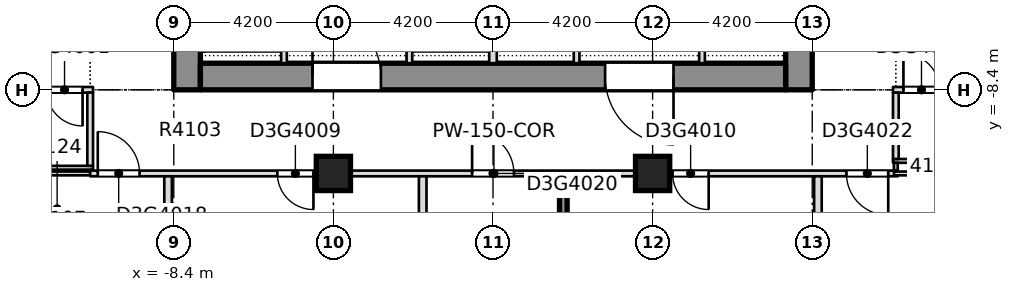
"""IFC4 building model, lengths in metres.
Left out: names, types, materials, properties, quantities, classifications, styles, units other than length and angle.
Written with IfcOpenShell. Run it as: python <this file> out.ifc"""

import sys

from ifc_helpers import new_model, si_unit, direction, frame, frame_2d, origin, origin_2d, place, context, subcontext, project, spatial, rectangle, extrude, element, fill, save


model = new_model("IFC4")
c1 = context("Model", 3, precision=1e-05, world=origin(), true_north=direction((0.0, 1.0)))
c2 = subcontext(c1, "Body", "Model", "MODEL_VIEW")
j1 = project(units=[si_unit("LENGTHUNIT", "METRE"), si_unit("PLANEANGLEUNIT", "RADIAN")], contexts=[c1])
p1 = place(None, origin())
s1 = spatial("IfcSite", under=j1, at=p1, CompositionType="ELEMENT")
p2 = place(p1, origin())
s2 = spatial("IfcBuilding", under=s1, at=p2, CompositionType="ELEMENT")
p3 = place(p2, frame((0.0, 0.0, 160.7)))
s3 = spatial("IfcBuildingStorey", under=s2, at=p3, CompositionType="ELEMENT", Elevation=160.7)
p4 = place(p3, frame((8.05, -8.4, -0.4), z_axis=(0.0, 0.0, 1.0), x_axis=(0.0, 1.0, 0.0)))
e1 = element("IfcWall", 1, at=p4, inside=s3, PredefinedType="SOLIDWALL", context=c2, shape_type="SweptSolid", body=[
    extrude(rectangle(XDim=30.15, YDim=0.7, at=frame_2d((15.075, 0.0))), origin(), (0.0, 0.0, 1.0), 3.45),
])
p5 = place(p4, frame((19.3, 0.0, 0.4)))
e2 = element("IfcOpeningElement", 2, at=p5, cuts=e1, PredefinedType="OPENING", context=c2, shape_type="SweptSolid", body=[
    extrude(rectangle(XDim=1.2, YDim=2.1, at=frame_2d((0.6, 1.05))), frame((0.0, 0.36, 0.0), z_axis=(0.0, -1.0, 0.0), x_axis=(1.0, 0.0, 0.0)), (0.0, 0.0, 1.0), 0.72),
])
p6 = place(p3, frame((-8.05, -8.4, -0.4), z_axis=(0.0, 0.0, 1.0), x_axis=(0.0, 1.0, 0.0)))
e3 = element("IfcWall", 3, at=p6, inside=s3, PredefinedType="SOLIDWALL", context=c2, shape_type="SweptSolid", body=[
    extrude(rectangle(XDim=30.15, YDim=0.7, at=frame_2d((15.075, 0.0))), origin(), (0.0, 0.0, 1.0), 3.45),
])
p7 = place(p6, frame((19.3, 0.0, 0.4)))
e4 = element("IfcOpeningElement", 4, at=p7, cuts=e3, PredefinedType="OPENING", context=c2, shape_type="SweptSolid", body=[
    extrude(rectangle(XDim=1.2, YDim=2.1, at=frame_2d((0.6, 1.05))), frame((0.0, 0.36, 0.0), z_axis=(0.0, -1.0, 0.0), x_axis=(1.0, 0.0, 0.0)), (0.0, 0.0, 1.0), 0.72),
])
p8 = place(p3, frame((-7.7, -8.05, -0.4), z_axis=(0.0, 0.0, 1.0), x_axis=(1.0, 0.0, 0.0)))
e5 = element("IfcWall", 5, at=p8, inside=s3, PredefinedType="SHEAR", context=c2, shape_type="SweptSolid", body=[
    extrude(rectangle(XDim=15.4, YDim=0.7, at=frame_2d((7.7, 0.0))), origin(), (0.0, 0.0, 1.0), 3.45),
])
p9 = place(p8, frame((2.95, 0.0, 0.4)))
e6 = element("IfcOpeningElement", 6, at=p9, cuts=e5, PredefinedType="OPENING", context=c2, shape_type="SweptSolid", body=[
    extrude(rectangle(XDim=1.8, YDim=2.1, at=frame_2d((0.9, 1.05))), frame((0.0, 0.36, 0.0), z_axis=(0.0, -1.0, 0.0), x_axis=(1.0, 0.0, 0.0)), (0.0, 0.0, 1.0), 0.72),
])
p10 = place(p8, frame((10.65, 0.0, 0.4)))
e7 = element("IfcOpeningElement", 7, at=p10, cuts=e5, PredefinedType="OPENING", context=c2, shape_type="SweptSolid", body=[
    extrude(rectangle(XDim=1.8, YDim=2.1, at=frame_2d((0.9, 1.05))), frame((0.0, 0.36, 0.0), z_axis=(0.0, -1.0, 0.0), x_axis=(1.0, 0.0, 0.0)), (0.0, 0.0, 1.0), 0.72),
])
for number, where, z_axis, x_axis in (
    (8, (-4.2, -10.6, -0.4), (0.0, 0.0, 1.0), (1.0, 0.0, 0.0)),
    (9, (4.2, -10.6, -0.4), (0.0, 0.0, 1.0), (1.0, 0.0, 0.0)),
):
    element("IfcColumn", number, at=place(p3, frame(where, z_axis=z_axis, x_axis=x_axis)), inside=s3, PredefinedType="COLUMN", context=c2, shape_type="SweptSolid", body=[
        extrude(rectangle(XDim=0.9, YDim=0.9, at=origin_2d()), origin(), (0.0, 0.0, 1.0), 3.45),
    ])
p11 = place(p3, frame((-12.3, -10.6, 0.0), z_axis=(0.0, 0.0, 1.0), x_axis=(1.0, 0.0, 0.0)))
e10 = element("IfcWall", 10, at=p11, inside=s3, PredefinedType="PARTITIONING", context=c2, shape_type="SweptSolid", body=[
    extrude(rectangle(XDim=1.7, YDim=0.1, at=frame_2d((0.85, 0.0))), origin(), (0.0, 0.0, 1.0), 3.05),
])
p12 = place(p3, frame((-10.6, -10.6, 0.0), z_axis=(0.0, 0.0, 1.0), x_axis=(1.0, 0.0, 0.0)))
e11 = element("IfcWall", 11, at=p12, inside=s3, PredefinedType="PARTITIONING", context=c2, shape_type="SweptSolid", body=[
    extrude(rectangle(XDim=21.25, YDim=0.15, at=frame_2d((10.625, 0.0))), origin(), (0.0, 0.0, 1.0), 3.05),
])
p13 = place(p12, frame((4.925, 0.0, 0.0)))
e12 = element("IfcOpeningElement", 12, at=p13, cuts=e11, PredefinedType="OPENING", context=c2, shape_type="SweptSolid", body=[
    extrude(rectangle(XDim=0.95, YDim=2.1, at=frame_2d((0.475, 1.05))), frame((0.0, 0.085, 0.0), z_axis=(0.0, -1.0, 0.0), x_axis=(1.0, 0.0, 0.0)), (0.0, 0.0, 1.0), 0.17),
])
p14 = place(p12, frame((15.325, 0.0, 0.0)))
e13 = element("IfcOpeningElement", 13, at=p14, cuts=e11, PredefinedType="OPENING", context=c2, shape_type="SweptSolid", body=[
    extrude(rectangle(XDim=0.95, YDim=2.1, at=frame_2d((0.475, 1.05))), frame((0.0, 0.085, 0.0), z_axis=(0.0, -1.0, 0.0), x_axis=(1.0, 0.0, 0.0)), (0.0, 0.0, 1.0), 0.17),
])
p15 = place(p12, frame((0.2, 0.0, 0.0)))
e14 = element("IfcOpeningElement", 14, at=p15, cuts=e11, PredefinedType="OPENING", context=c2, shape_type="SweptSolid", body=[
    extrude(rectangle(XDim=1.1, YDim=2.1, at=frame_2d((0.55, 1.05))), frame((0.0, 0.085, 0.0), z_axis=(0.0, -1.0, 0.0), x_axis=(1.0, 0.0, 0.0)), (0.0, 0.0, 1.0), 0.17),
])
p16 = place(p12, frame((10.05, 0.0, 0.0)))
e15 = element("IfcOpeningElement", 15, at=p16, cuts=e11, PredefinedType="OPENING", context=c2, shape_type="SweptSolid", body=[
    extrude(rectangle(XDim=1.1, YDim=2.1, at=frame_2d((0.55, 1.05))), frame((0.0, 0.085, 0.0), z_axis=(0.0, -1.0, 0.0), x_axis=(1.0, 0.0, 0.0)), (0.0, 0.0, 1.0), 0.17),
])
p17 = place(p12, frame((19.9, 0.0, 0.0)))
e16 = element("IfcOpeningElement", 16, at=p17, cuts=e11, PredefinedType="OPENING", context=c2, shape_type="SweptSolid", body=[
    extrude(rectangle(XDim=1.1, YDim=2.1, at=frame_2d((0.55, 1.05))), frame((0.0, 0.085, 0.0), z_axis=(0.0, -1.0, 0.0), x_axis=(1.0, 0.0, 0.0)), (0.0, 0.0, 1.0), 0.17),
])
p18 = place(p3, frame((10.55, -10.6, 0.0), z_axis=(0.0, 0.0, 1.0), x_axis=(1.0, 0.0, 0.0)))
e17 = element("IfcWall", 17, at=p18, inside=s3, PredefinedType="PARTITIONING", context=c2, shape_type="SweptSolid", body=[
    extrude(rectangle(XDim=1.75, YDim=0.1, at=frame_2d((0.875, 0.0))), origin(), (0.0, 0.0, 1.0), 3.05),
])
p19 = place(p3, frame((-13.55, -10.45, 0.0), z_axis=(0.0, 0.0, 1.0), x_axis=(1.0, 0.0, 0.0)))
e18 = element("IfcWall", 18, at=p19, inside=s3, PredefinedType="PARTITIONING", context=c2, shape_type="SweptSolid", body=[
    extrude(rectangle(XDim=3.025, YDim=0.1, at=frame_2d((1.513, 0.0))), origin(), (0.0, 0.0, 1.0), 3.05),
])
p20 = place(p3, frame((10.525, -10.27, 0.0), z_axis=(0.0, 0.0, 1.0), x_axis=(1.0, 0.0, 0.0)))
e19 = element("IfcWall", 19, at=p20, inside=s3, PredefinedType="PARTITIONING", context=c2, shape_type="SweptSolid", body=[
    extrude(rectangle(XDim=2.725, YDim=0.1, at=frame_2d((1.363, 0.0))), origin(), (0.0, 0.0, 1.0), 3.05),
])
p21 = place(p3, frame((-21.55, -8.4, 0.0), z_axis=(0.0, 0.0, 1.0), x_axis=(1.0, 0.0, 0.0)))
e20 = element("IfcWall", 20, at=p21, inside=s3, PredefinedType="PARTITIONING", context=c2, shape_type="SweptSolid", body=[
    extrude(rectangle(XDim=11.025, YDim=0.15, at=frame_2d((5.513, 0.0))), origin(), (0.0, 0.0, 1.0), 3.05),
])
p22 = place(p21, frame((9.8, 0.0, 0.0)))
e21 = element("IfcOpeningElement", 21, at=p22, cuts=e20, PredefinedType="OPENING", context=c2, shape_type="SweptSolid", body=[
    extrude(rectangle(XDim=0.95, YDim=2.1, at=frame_2d((0.475, 1.05))), frame((0.0, 0.085, 0.0), z_axis=(0.0, -1.0, 0.0), x_axis=(1.0, 0.0, 0.0)), (0.0, 0.0, 1.0), 0.17),
])
p23 = place(p3, frame((10.525, -8.4, 0.0), z_axis=(0.0, 0.0, 1.0), x_axis=(1.0, 0.0, 0.0)))
e22 = element("IfcWall", 22, at=p23, inside=s3, PredefinedType="PARTITIONING", context=c2, shape_type="SweptSolid", body=[
    extrude(rectangle(XDim=11.025, YDim=0.15, at=frame_2d((5.513, 0.0))), origin(), (0.0, 0.0, 1.0), 3.05),
])
p24 = place(p23, frame((0.275, 0.0, 0.0)))
e23 = element("IfcOpeningElement", 23, at=p24, cuts=e22, PredefinedType="OPENING", context=c2, shape_type="SweptSolid", body=[
    extrude(rectangle(XDim=0.95, YDim=2.1, at=frame_2d((0.475, 1.05))), frame((0.0, 0.085, 0.0), z_axis=(0.0, -1.0, 0.0), x_axis=(1.0, 0.0, 0.0)), (0.0, 0.0, 1.0), 0.17),
])
p25 = place(p3, frame((-10.6, -10.4, 0.0), z_axis=(0.0, 0.0, 1.0), x_axis=(0.0, 1.0, 0.0)))
e24 = element("IfcWall", 24, at=p25, inside=s3, PredefinedType="PARTITIONING", context=c2, shape_type="SweptSolid", body=[
    extrude(rectangle(XDim=1.925, YDim=0.15, at=frame_2d((0.962, 0.0))), origin(), (0.0, 0.0, 1.0), 3.05),
])
for number, where, z_axis, x_axis in (
    (25, (-8.55, -12.998, 0.0), (0.0, 0.0, 1.0), (0.0, 1.0, 0.0)),
    (26, (-1.85, -12.998, 0.0), (0.0, 0.0, 1.0), (0.0, 1.0, 0.0)),
    (27, (8.55, -12.998, 0.0), (0.0, 0.0, 1.0), (0.0, 1.0, 0.0)),
):
    element("IfcWall", number, at=place(p3, frame(where, z_axis=z_axis, x_axis=x_axis)), inside=s3, PredefinedType="PARTITIONING", context=c2, shape_type="SweptSolid", body=[
        extrude(rectangle(XDim=2.323, YDim=0.2, at=frame_2d((1.162, 0.0))), origin(), (0.0, 0.0, 1.0), 3.05),
    ])
p26 = place(p3, frame((10.6, -10.525, 0.0), z_axis=(0.0, 0.0, 1.0), x_axis=(0.0, 1.0, 0.0)))
e28 = element("IfcWall", 28, at=p26, inside=s3, PredefinedType="PARTITIONING", context=c2, shape_type="SweptSolid", body=[
    extrude(rectangle(XDim=0.205, YDim=0.1, at=frame_2d((0.103, 0.0))), origin(), (0.0, 0.0, 1.0), 3.05),
])
p27 = place(p3, frame((10.6, -10.22, 0.0), z_axis=(0.0, 0.0, 1.0), x_axis=(0.0, 1.0, 0.0)))
e29 = element("IfcWall", 29, at=p27, inside=s3, PredefinedType="PARTITIONING", context=c2, shape_type="SweptSolid", body=[
    extrude(rectangle(XDim=1.745, YDim=0.15, at=frame_2d((0.873, 0.0))), origin(), (0.0, 0.0, 1.0), 3.05),
])
p28 = place(p3, frame((-5.5, -7.699, 0.0), z_axis=(0.0, 0.0, 1.0), x_axis=(0.0, 1.0, 0.0)))
e30 = element("IfcWall", 30, at=p28, inside=s3, PredefinedType="PARTITIONING", context=c2, shape_type="SweptSolid", body=[
    extrude(rectangle(XDim=12.124, YDim=0.15, at=frame_2d((6.062, 0.0))), origin(), (0.0, 0.0, 1.0), 3.05),
])
p29 = place(p28, frame((1.149, 0.0, 0.0)))
e31 = element("IfcOpeningElement", 31, at=p29, cuts=e30, PredefinedType="OPENING", context=c2, shape_type="SweptSolid", body=[
    extrude(rectangle(XDim=1.1, YDim=2.1, at=frame_2d((0.55, 1.05))), frame((0.0, 0.085, 0.0), z_axis=(0.0, -1.0, 0.0), x_axis=(1.0, 0.0, 0.0)), (0.0, 0.0, 1.0), 0.17),
])
p30 = place(p28, frame((4.149, 0.0, 0.0)))
e32 = element("IfcOpeningElement", 32, at=p30, cuts=e30, PredefinedType="OPENING", context=c2, shape_type="SweptSolid", body=[
    extrude(rectangle(XDim=1.1, YDim=2.1, at=frame_2d((0.55, 1.05))), frame((0.0, 0.085, 0.0), z_axis=(0.0, -1.0, 0.0), x_axis=(1.0, 0.0, 0.0)), (0.0, 0.0, 1.0), 0.17),
])
p31 = place(p28, frame((7.149, 0.0, 0.0)))
e33 = element("IfcOpeningElement", 33, at=p31, cuts=e30, PredefinedType="OPENING", context=c2, shape_type="SweptSolid", body=[
    extrude(rectangle(XDim=1.1, YDim=2.1, at=frame_2d((0.55, 1.05))), frame((0.0, 0.085, 0.0), z_axis=(0.0, -1.0, 0.0), x_axis=(1.0, 0.0, 0.0)), (0.0, 0.0, 1.0), 0.17),
])
p32 = place(p28, frame((10.149, 0.0, 0.0)))
e34 = element("IfcOpeningElement", 34, at=p32, cuts=e30, PredefinedType="OPENING", context=c2, shape_type="SweptSolid", body=[
    extrude(rectangle(XDim=1.1, YDim=2.1, at=frame_2d((0.55, 1.05))), frame((0.0, 0.085, 0.0), z_axis=(0.0, -1.0, 0.0), x_axis=(1.0, 0.0, 0.0)), (0.0, 0.0, 1.0), 0.17),
])
p33 = place(p3, frame((-2.2, -7.699, 0.0), z_axis=(0.0, 0.0, 1.0), x_axis=(0.0, 1.0, 0.0)))
e35 = element("IfcWall", 35, at=p33, inside=s3, PredefinedType="PARTITIONING", context=c2, shape_type="SweptSolid", body=[
    extrude(rectangle(XDim=12.124, YDim=0.15, at=frame_2d((6.062, 0.0))), origin(), (0.0, 0.0, 1.0), 3.05),
])
p34 = place(p33, frame((1.149, 0.0, 0.0)))
e36 = element("IfcOpeningElement", 36, at=p34, cuts=e35, PredefinedType="OPENING", context=c2, shape_type="SweptSolid", body=[
    extrude(rectangle(XDim=1.1, YDim=2.1, at=frame_2d((0.55, 1.05))), frame((0.0, 0.085, 0.0), z_axis=(0.0, -1.0, 0.0), x_axis=(1.0, 0.0, 0.0)), (0.0, 0.0, 1.0), 0.17),
])
p35 = place(p33, frame((4.224, 0.0, 0.0)))
e37 = element("IfcOpeningElement", 37, at=p35, cuts=e35, PredefinedType="OPENING", context=c2, shape_type="SweptSolid", body=[
    extrude(rectangle(XDim=0.95, YDim=2.1, at=frame_2d((0.475, 1.05))), frame((0.0, 0.085, 0.0), z_axis=(0.0, -1.0, 0.0), x_axis=(1.0, 0.0, 0.0)), (0.0, 0.0, 1.0), 0.17),
])
p36 = place(p33, frame((8.724, 0.0, 0.0)))
e38 = element("IfcOpeningElement", 38, at=p36, cuts=e35, PredefinedType="OPENING", context=c2, shape_type="SweptSolid", body=[
    extrude(rectangle(XDim=0.95, YDim=2.1, at=frame_2d((0.475, 1.05))), frame((0.0, 0.085, 0.0), z_axis=(0.0, -1.0, 0.0), x_axis=(1.0, 0.0, 0.0)), (0.0, 0.0, 1.0), 0.17),
])
p37 = place(p3, frame((0.0, -7.699, 0.0), z_axis=(0.0, 0.0, 1.0), x_axis=(0.0, 1.0, 0.0)))
e39 = element("IfcWall", 39, at=p37, inside=s3, PredefinedType="PARTITIONING", context=c2, shape_type="SweptSolid", body=[
    extrude(rectangle(XDim=12.124, YDim=0.2, at=frame_2d((6.062, 0.0))), origin(), (0.0, 0.0, 1.0), 3.05),
])
p38 = place(p3, frame((2.2, -7.699, 0.0), z_axis=(0.0, 0.0, 1.0), x_axis=(0.0, 1.0, 0.0)))
e40 = element("IfcWall", 40, at=p38, inside=s3, PredefinedType="PARTITIONING", context=c2, shape_type="SweptSolid", body=[
    extrude(rectangle(XDim=12.124, YDim=0.15, at=frame_2d((6.062, 0.0))), origin(), (0.0, 0.0, 1.0), 3.05),
])
p39 = place(p38, frame((1.724, 0.0, 0.0)))
e41 = element("IfcOpeningElement", 41, at=p39, cuts=e40, PredefinedType="OPENING", context=c2, shape_type="SweptSolid", body=[
    extrude(rectangle(XDim=0.95, YDim=2.1, at=frame_2d((0.475, 1.05))), frame((0.0, 0.085, 0.0), z_axis=(0.0, -1.0, 0.0), x_axis=(1.0, 0.0, 0.0)), (0.0, 0.0, 1.0), 0.17),
])
p40 = place(p38, frame((5.724, 0.0, 0.0)))
e42 = element("IfcOpeningElement", 42, at=p40, cuts=e40, PredefinedType="OPENING", context=c2, shape_type="SweptSolid", body=[
    extrude(rectangle(XDim=0.95, YDim=2.1, at=frame_2d((0.475, 1.05))), frame((0.0, 0.085, 0.0), z_axis=(0.0, -1.0, 0.0), x_axis=(1.0, 0.0, 0.0)), (0.0, 0.0, 1.0), 0.17),
])
p41 = place(p38, frame((9.724, 0.0, 0.0)))
e43 = element("IfcOpeningElement", 43, at=p41, cuts=e40, PredefinedType="OPENING", context=c2, shape_type="SweptSolid", body=[
    extrude(rectangle(XDim=0.95, YDim=2.1, at=frame_2d((0.475, 1.05))), frame((0.0, 0.085, 0.0), z_axis=(0.0, -1.0, 0.0), x_axis=(1.0, 0.0, 0.0)), (0.0, 0.0, 1.0), 0.17),
])
p42 = place(p3, frame((5.5, -7.699, 0.0), z_axis=(0.0, 0.0, 1.0), x_axis=(0.0, 1.0, 0.0)))
e44 = element("IfcWall", 44, at=p42, inside=s3, PredefinedType="PARTITIONING", context=c2, shape_type="SweptSolid", body=[
    extrude(rectangle(XDim=12.124, YDim=0.15, at=frame_2d((6.062, 0.0))), origin(), (0.0, 0.0, 1.0), 3.05),
])
p43 = place(p42, frame((5.724, 0.0, 0.0)))
e45 = element("IfcOpeningElement", 45, at=p43, cuts=e44, PredefinedType="OPENING", context=c2, shape_type="SweptSolid", body=[
    extrude(rectangle(XDim=0.95, YDim=2.1, at=frame_2d((0.475, 1.05))), frame((0.0, 0.085, 0.0), z_axis=(0.0, -1.0, 0.0), x_axis=(1.0, 0.0, 0.0)), (0.0, 0.0, 1.0), 0.17),
])
p44 = place(p3, frame((1.85, -21.55, 0.0), z_axis=(0.0, 0.0, 1.0), x_axis=(0.0, 1.0, 0.0)))
e46 = element("IfcWall", 46, at=p44, inside=s3, PredefinedType="SOLIDWALL", context=c2, shape_type="SweptSolid", body=[
    extrude(rectangle(XDim=10.875, YDim=0.2, at=frame_2d((5.438, 0.0))), origin(), (0.0, 0.0, 1.0), 3.05),
])
p45 = place(p22, origin())
e47 = element("IfcDoor", 47, at=p45, inside=s3, OperationType="SINGLE_SWING_RIGHT", PredefinedType="DOOR", context=c2, shape_type="SweptSolid", body=[
    extrude(rectangle(XDim=0.95, YDim=2.1, at=frame_2d((0.475, 1.05))), frame((0.0, 0.025, 0.0), z_axis=(0.0, -1.0, 0.0), x_axis=(1.0, 0.0, 0.0)), (0.0, 0.0, 1.0), 0.05),
])
fill(e21, e47)
p46 = place(p13, origin())
e48 = element("IfcDoor", 48, at=p46, inside=s3, OperationType="SINGLE_SWING_LEFT", PredefinedType="DOOR", context=c2, shape_type="SweptSolid", body=[
    extrude(rectangle(XDim=0.95, YDim=2.1, at=frame_2d((0.475, 1.05))), frame((0.0, 0.025, 0.0), z_axis=(0.0, -1.0, 0.0), x_axis=(1.0, 0.0, 0.0)), (0.0, 0.0, 1.0), 0.05),
])
fill(e12, e48)
p47 = place(p14, origin())
e49 = element("IfcDoor", 49, at=p47, inside=s3, OperationType="SINGLE_SWING_LEFT", PredefinedType="DOOR", context=c2, shape_type="SweptSolid", body=[
    extrude(rectangle(XDim=0.95, YDim=2.1, at=frame_2d((0.475, 1.05))), frame((0.0, 0.025, 0.0), z_axis=(0.0, -1.0, 0.0), x_axis=(1.0, 0.0, 0.0)), (0.0, 0.0, 1.0), 0.05),
])
fill(e13, e49)
p48 = place(p24, origin())
e50 = element("IfcDoor", 50, at=p48, inside=s3, OperationType="SINGLE_SWING_RIGHT", PredefinedType="DOOR", context=c2, shape_type="SweptSolid", body=[
    extrude(rectangle(XDim=0.95, YDim=2.1, at=frame_2d((0.475, 1.05))), frame((0.0, 0.025, 0.0), z_axis=(0.0, -1.0, 0.0), x_axis=(1.0, 0.0, 0.0)), (0.0, 0.0, 1.0), 0.05),
])
fill(e23, e50)
p49 = place(p15, origin())
e51 = element("IfcDoor", 51, at=p49, inside=s3, OperationType="SINGLE_SWING_RIGHT", PredefinedType="DOOR", context=c2, shape_type="SweptSolid", body=[
    extrude(rectangle(XDim=1.1, YDim=2.1, at=frame_2d((0.55, 1.05))), frame((0.0, 0.025, 0.0), z_axis=(0.0, -1.0, 0.0), x_axis=(1.0, 0.0, 0.0)), (0.0, 0.0, 1.0), 0.05),
])
fill(e14, e51)
p50 = place(p16, origin())
e52 = element("IfcDoor", 52, at=p50, inside=s3, OperationType="SINGLE_SWING_LEFT", PredefinedType="DOOR", context=c2, shape_type="SweptSolid", body=[
    extrude(rectangle(XDim=1.1, YDim=2.1, at=frame_2d((0.55, 1.05))), frame((0.0, 0.025, 0.0), z_axis=(0.0, -1.0, 0.0), x_axis=(1.0, 0.0, 0.0)), (0.0, 0.0, 1.0), 0.05),
])
fill(e15, e52)
p51 = place(p17, origin())
e53 = element("IfcDoor", 53, at=p51, inside=s3, OperationType="SINGLE_SWING_LEFT", PredefinedType="DOOR", context=c2, shape_type="SweptSolid", body=[
    extrude(rectangle(XDim=1.1, YDim=2.1, at=frame_2d((0.55, 1.05))), frame((0.0, 0.025, 0.0), z_axis=(0.0, -1.0, 0.0), x_axis=(1.0, 0.0, 0.0)), (0.0, 0.0, 1.0), 0.05),
])
fill(e16, e53)
p52 = place(p9, origin())
e54 = element("IfcDoor", 54, at=p52, inside=s3, OperationType="SINGLE_SWING_LEFT", PredefinedType="DOOR", context=c2, shape_type="SweptSolid", body=[
    extrude(rectangle(XDim=1.8, YDim=2.1, at=frame_2d((0.9, 1.05))), frame((0.0, 0.025, 0.0), z_axis=(0.0, -1.0, 0.0), x_axis=(1.0, 0.0, 0.0)), (0.0, 0.0, 1.0), 0.05),
])
fill(e6, e54)
p53 = place(p10, origin())
e55 = element("IfcDoor", 55, at=p53, inside=s3, OperationType="SINGLE_SWING_LEFT", PredefinedType="DOOR", context=c2, shape_type="SweptSolid", body=[
    extrude(rectangle(XDim=1.8, YDim=2.1, at=frame_2d((0.9, 1.05))), frame((0.0, 0.025, 0.0), z_axis=(0.0, -1.0, 0.0), x_axis=(1.0, 0.0, 0.0)), (0.0, 0.0, 1.0), 0.05),
])
fill(e7, e55)
save(model, sys.argv[1])
